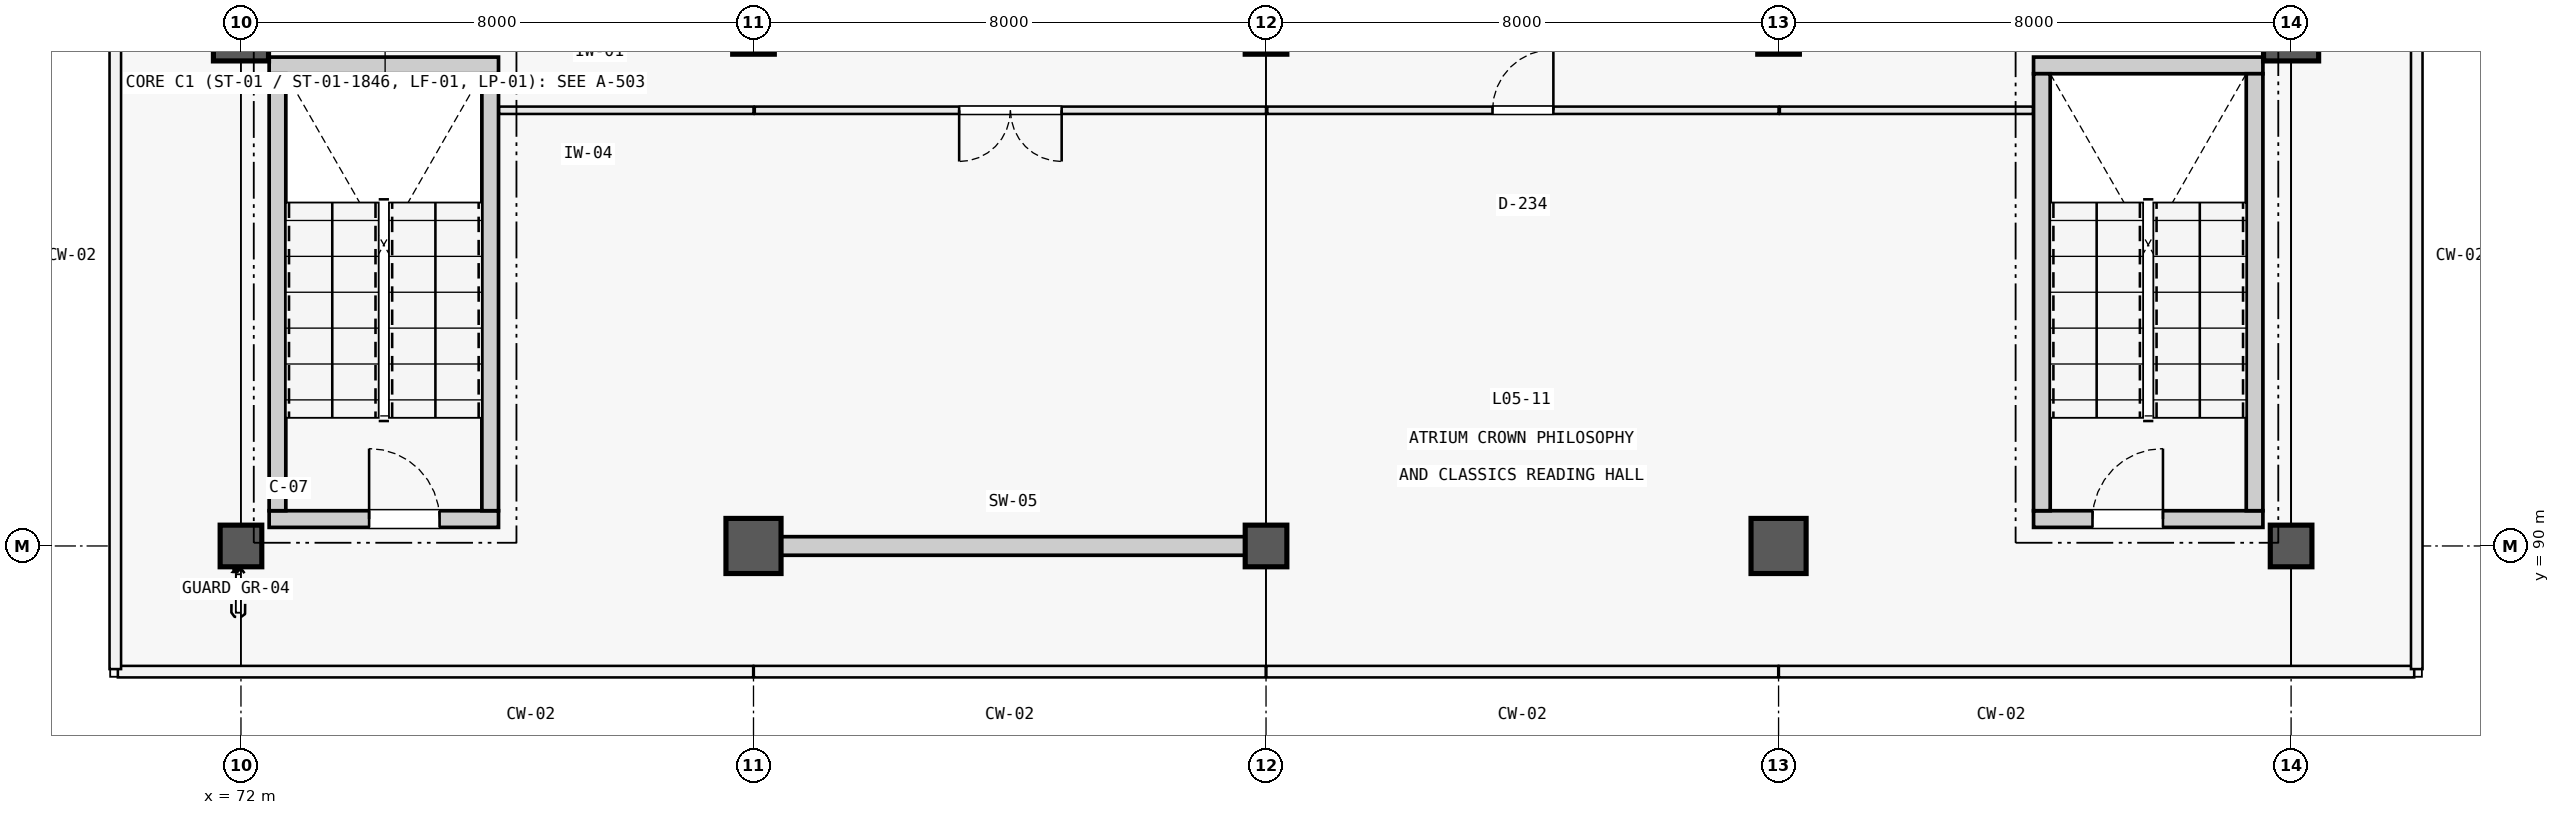
"""IFC4 building model, lengths in metres.
Left out: names, types, materials, properties, quantities, classifications, styles, units other than length and angle.
Written with IfcOpenShell. Run it as: python <this file> out.ifc"""

import sys

from ifc_helpers import new_model, si_unit, direction, frame, frame_2d, origin, origin_2d, place, context, subcontext, project, spatial, rectangle, extrude, element, fill, save


model = new_model("IFC4")
c1 = context("Model", 3, precision=1e-05, world=origin(), true_north=direction((0.0, 1.0)))
c2 = subcontext(c1, "Body", "Model", "MODEL_VIEW")
j1 = project(units=[si_unit("LENGTHUNIT", "METRE"), si_unit("PLANEANGLEUNIT", "RADIAN")], contexts=[c1])
p1 = place(None, origin())
s1 = spatial("IfcSite", under=j1, at=p1, CompositionType="ELEMENT")
p2 = place(p1, origin())
s2 = spatial("IfcBuilding", under=s1, at=p2, CompositionType="ELEMENT")
p3 = place(p2, frame((0.0, 0.0, 20.1)))
s3 = spatial("IfcBuildingStorey", under=s2, at=p3, CompositionType="ELEMENT", Elevation=20.1)
p4 = place(p3, frame((72.0, 90.0, 0.0), z_axis=(0.0, 0.0, 1.0), x_axis=(1.0, 0.0, 0.0)))
e1 = element("IfcColumn", 1, at=p4, inside=s3, PredefinedType="COLUMN", context=c2, shape_type="SweptSolid", body=[
    extrude(rectangle(XDim=0.65, YDim=0.65, at=origin_2d()), origin(), (0.0, 0.0, 1.0), 4.8),
])
for number, where, z_axis, x_axis in (
    (2, (72.0, 98.0, 0.0), (0.0, 0.0, 1.0), (1.0, 0.0, 0.0)),
    (3, (80.0, 90.0, 0.0), (0.0, 0.0, 1.0), (1.0, 0.0, 0.0)),
):
    element("IfcColumn", number, at=place(p3, frame(where, z_axis=z_axis, x_axis=x_axis)), inside=s3, PredefinedType="COLUMN", context=c2, shape_type="SweptSolid", body=[
        extrude(rectangle(XDim=0.86, YDim=0.86, at=origin_2d()), origin(), (0.0, 0.0, 1.0), 4.8),
    ])
for number, where, z_axis, x_axis in (
    (4, (80.0, 98.0, 0.0), (0.0, 0.0, 1.0), (1.0, 0.0, 0.0)),
    (5, (88.0, 90.0, 0.0), (0.0, 0.0, 1.0), (1.0, 0.0, 0.0)),
    (6, (88.0, 98.0, 0.0), (0.0, 0.0, 1.0), (1.0, 0.0, 0.0)),
):
    element("IfcColumn", number, at=place(p3, frame(where, z_axis=z_axis, x_axis=x_axis)), inside=s3, PredefinedType="COLUMN", context=c2, shape_type="SweptSolid", body=[
        extrude(rectangle(XDim=0.65, YDim=0.65, at=origin_2d()), origin(), (0.0, 0.0, 1.0), 4.8),
    ])
p5 = place(p3, frame((96.0, 90.0, 0.0), z_axis=(0.0, 0.0, 1.0), x_axis=(1.0, 0.0, 0.0)))
e7 = element("IfcColumn", 7, at=p5, inside=s3, PredefinedType="COLUMN", context=c2, shape_type="SweptSolid", body=[
    extrude(rectangle(XDim=0.86, YDim=0.86, at=origin_2d()), origin(), (0.0, 0.0, 1.0), 4.8),
])
for number, where, z_axis, x_axis in (
    (8, (96.0, 98.0, 0.0), (0.0, 0.0, 1.0), (1.0, 0.0, 0.0)),
    (9, (104.0, 90.0, 0.0), (0.0, 0.0, 1.0), (1.0, 0.0, 0.0)),
):
    element("IfcColumn", number, at=place(p3, frame(where, z_axis=z_axis, x_axis=x_axis)), inside=s3, PredefinedType="COLUMN", context=c2, shape_type="SweptSolid", body=[
        extrude(rectangle(XDim=0.65, YDim=0.65, at=origin_2d()), origin(), (0.0, 0.0, 1.0), 4.8),
    ])
p6 = place(p3, frame((104.0, 98.0, 0.0), z_axis=(0.0, 0.0, 1.0), x_axis=(1.0, 0.0, 0.0)))
e10 = element("IfcColumn", 10, at=p6, inside=s3, PredefinedType="COLUMN", context=c2, shape_type="SweptSolid", body=[
    extrude(rectangle(XDim=0.86, YDim=0.86, at=origin_2d()), origin(), (0.0, 0.0, 1.0), 4.8),
])
p7 = place(p3, frame((80.43, 90.0, 0.0), z_axis=(0.0, 0.0, 1.0), x_axis=(1.0, 0.0, 0.0)))
e11 = element("IfcWall", 11, at=p7, inside=s3, PredefinedType="SHEAR", context=c2, shape_type="SweptSolid", body=[
    extrude(rectangle(XDim=7.245, YDim=0.29, at=frame_2d((3.623, 0.0))), origin(), (0.0, 0.0, 1.0), 4.5),
])
p8 = place(p3, frame((72.44, 90.42, 0.0), z_axis=(0.0, 0.0, 1.0), x_axis=(1.0, 0.0, 0.0)))
e12 = element("IfcWall", 12, at=p8, inside=s3, PredefinedType="SOLIDWALL", context=c2, shape_type="SweptSolid", body=[
    extrude(rectangle(XDim=3.58, YDim=0.26, at=frame_2d((1.79, 0.0))), origin(), (0.0, 0.0, 1.0), 4.8),
])
p9 = place(p8, frame((1.56, 0.0, 0.0)))
e13 = element("IfcOpeningElement", 13, at=p9, cuts=e12, PredefinedType="OPENING", context=c2, shape_type="SweptSolid", body=[
    extrude(rectangle(XDim=1.1, YDim=2.2, at=frame_2d((0.55, 1.1))), frame((0.0, 0.142, 0.0), z_axis=(0.0, -1.0, 0.0), x_axis=(1.0, 0.0, 0.0)), (0.0, 0.0, 1.0), 0.284),
])
p10 = place(p3, frame((72.44, 97.5, 0.0), z_axis=(0.0, 0.0, 1.0), x_axis=(1.0, 0.0, 0.0)))
e14 = element("IfcWall", 14, at=p10, inside=s3, PredefinedType="SOLIDWALL", context=c2, shape_type="SweptSolid", body=[
    extrude(rectangle(XDim=3.58, YDim=0.26, at=frame_2d((1.79, 0.0))), origin(), (0.0, 0.0, 1.0), 4.8),
])
for number, where, z_axis, x_axis in (
    (15, (72.57, 90.55, 0.0), (0.0, 0.0, 1.0), (0.0, 1.0, 0.0)),
    (16, (75.89, 90.55, 0.0), (0.0, 0.0, 1.0), (0.0, 1.0, 0.0)),
):
    element("IfcWall", number, at=place(p3, frame(where, z_axis=z_axis, x_axis=x_axis)), inside=s3, PredefinedType="SOLIDWALL", context=c2, shape_type="SweptSolid", body=[
        extrude(rectangle(XDim=6.82, YDim=0.26, at=frame_2d((3.41, 0.0))), origin(), (0.0, 0.0, 1.0), 4.8),
    ])
p11 = place(p3, frame((99.98, 90.42, 0.0), z_axis=(0.0, 0.0, 1.0), x_axis=(1.0, 0.0, 0.0)))
e17 = element("IfcWall", 17, at=p11, inside=s3, PredefinedType="SOLIDWALL", context=c2, shape_type="SweptSolid", body=[
    extrude(rectangle(XDim=3.58, YDim=0.26, at=frame_2d((1.79, 0.0))), origin(), (0.0, 0.0, 1.0), 4.8),
])
p12 = place(p11, frame((0.92, 0.0, 0.0)))
e18 = element("IfcOpeningElement", 18, at=p12, cuts=e17, PredefinedType="OPENING", context=c2, shape_type="SweptSolid", body=[
    extrude(rectangle(XDim=1.1, YDim=2.2, at=frame_2d((0.55, 1.1))), frame((0.0, 0.142, 0.0), z_axis=(0.0, -1.0, 0.0), x_axis=(1.0, 0.0, 0.0)), (0.0, 0.0, 1.0), 0.284),
])
p13 = place(p3, frame((99.98, 97.5, 0.0), z_axis=(0.0, 0.0, 1.0), x_axis=(1.0, 0.0, 0.0)))
e19 = element("IfcWall", 19, at=p13, inside=s3, PredefinedType="SOLIDWALL", context=c2, shape_type="SweptSolid", body=[
    extrude(rectangle(XDim=3.58, YDim=0.26, at=frame_2d((1.79, 0.0))), origin(), (0.0, 0.0, 1.0), 4.8),
])
for number, where, z_axis, x_axis in (
    (20, (100.11, 90.55, 0.0), (0.0, 0.0, 1.0), (0.0, 1.0, 0.0)),
    (21, (103.43, 90.55, 0.0), (0.0, 0.0, 1.0), (0.0, 1.0, 0.0)),
):
    element("IfcWall", number, at=place(p3, frame(where, z_axis=z_axis, x_axis=x_axis)), inside=s3, PredefinedType="SOLIDWALL", context=c2, shape_type="SweptSolid", body=[
        extrude(rectangle(XDim=6.82, YDim=0.26, at=frame_2d((3.41, 0.0))), origin(), (0.0, 0.0, 1.0), 4.8),
    ])
p14 = place(p3, frame((76.03, 96.8, 0.0), z_axis=(0.0, 0.0, 1.0), x_axis=(1.0, 0.0, 0.0)))
e22 = element("IfcWall", 22, at=p14, inside=s3, PredefinedType="PARTITIONING", context=c2, shape_type="SweptSolid", body=[
    extrude(rectangle(XDim=3.97, YDim=0.115, at=frame_2d((1.985, 0.0))), origin(), (0.0, 0.0, 1.0), 3.35),
])
p15 = place(p3, frame((80.02, 96.8, 0.0), z_axis=(0.0, 0.0, 1.0), x_axis=(1.0, 0.0, 0.0)))
e23 = element("IfcWall", 23, at=p15, inside=s3, PredefinedType="PARTITIONING", context=c2, shape_type="SweptSolid", body=[
    extrude(rectangle(XDim=7.98, YDim=0.115, at=frame_2d((3.99, 0.0))), origin(), (0.0, 0.0, 1.0), 3.35),
])
p16 = place(p15, frame((3.19, 0.0, 0.0)))
e24 = element("IfcOpeningElement", 24, at=p16, cuts=e23, PredefinedType="OPENING", context=c2, shape_type="SweptSolid", body=[
    extrude(rectangle(XDim=1.6, YDim=2.2, at=frame_2d((0.8, 1.1))), frame((0.0, 0.069, 0.0), z_axis=(0.0, -1.0, 0.0), x_axis=(1.0, 0.0, 0.0)), (0.0, 0.0, 1.0), 0.139),
])
p17 = place(p3, frame((88.02, 96.8, 0.0), z_axis=(0.0, 0.0, 1.0), x_axis=(1.0, 0.0, 0.0)))
e25 = element("IfcWall", 25, at=p17, inside=s3, PredefinedType="PARTITIONING", context=c2, shape_type="SweptSolid", body=[
    extrude(rectangle(XDim=7.98, YDim=0.115, at=frame_2d((3.99, 0.0))), origin(), (0.0, 0.0, 1.0), 3.35),
])
p18 = place(p17, frame((3.515, 0.0, 0.0)))
e26 = element("IfcOpeningElement", 26, at=p18, cuts=e25, PredefinedType="OPENING", context=c2, shape_type="SweptSolid", body=[
    extrude(rectangle(XDim=0.95, YDim=2.15, at=frame_2d((0.475, 1.075))), frame((0.0, 0.069, 0.0), z_axis=(0.0, -1.0, 0.0), x_axis=(1.0, 0.0, 0.0)), (0.0, 0.0, 1.0), 0.139),
])
p19 = place(p3, frame((96.02, 96.8, 0.0), z_axis=(0.0, 0.0, 1.0), x_axis=(1.0, 0.0, 0.0)))
e27 = element("IfcWall", 27, at=p19, inside=s3, PredefinedType="PARTITIONING", context=c2, shape_type="SweptSolid", body=[
    extrude(rectangle(XDim=3.95, YDim=0.115, at=frame_2d((1.975, 0.0))), origin(), (0.0, 0.0, 1.0), 3.35),
])
p20 = place(p9, origin())
e28 = element("IfcDoor", 28, at=p20, inside=s3, OperationType="SINGLE_SWING_LEFT", PredefinedType="DOOR", context=c2, shape_type="SweptSolid", body=[
    extrude(rectangle(XDim=1.1, YDim=2.2, at=frame_2d((0.55, 1.1))), frame((0.0, 0.025, 0.0), z_axis=(0.0, -1.0, 0.0), x_axis=(1.0, 0.0, 0.0)), (0.0, 0.0, 1.0), 0.05),
])
fill(e13, e28)
p21 = place(p12, origin())
e29 = element("IfcDoor", 29, at=p21, inside=s3, OperationType="SINGLE_SWING_RIGHT", PredefinedType="DOOR", context=c2, shape_type="SweptSolid", body=[
    extrude(rectangle(XDim=1.1, YDim=2.2, at=frame_2d((0.55, 1.1))), frame((0.0, 0.025, 0.0), z_axis=(0.0, -1.0, 0.0), x_axis=(1.0, 0.0, 0.0)), (0.0, 0.0, 1.0), 0.05),
])
fill(e18, e29)
p22 = place(p16, frame((1.6, 0.0, 0.0), z_axis=(0.0, 0.0, 1.0), x_axis=(-1.0, 0.0, 0.0)))
e30 = element("IfcDoor", 30, at=p22, inside=s3, OperationType="DOUBLE_DOOR_SINGLE_SWING", PredefinedType="DOOR", context=c2, shape_type="SweptSolid", body=[
    extrude(rectangle(XDim=1.6, YDim=2.2, at=frame_2d((0.8, 1.1))), frame((0.0, 0.025, 0.0), z_axis=(0.0, -1.0, 0.0), x_axis=(1.0, 0.0, 0.0)), (0.0, 0.0, 1.0), 0.05),
])
fill(e24, e30)
p23 = place(p18, origin())
e31 = element("IfcDoor", 31, at=p23, inside=s3, OperationType="SINGLE_SWING_RIGHT", PredefinedType="DOOR", context=c2, shape_type="SweptSolid", body=[
    extrude(rectangle(XDim=0.95, YDim=2.15, at=frame_2d((0.475, 1.075))), frame((0.0, 0.025, 0.0), z_axis=(0.0, -1.0, 0.0), x_axis=(1.0, 0.0, 0.0)), (0.0, 0.0, 1.0), 0.05),
])
fill(e26, e31)
save(model, sys.argv[1])
